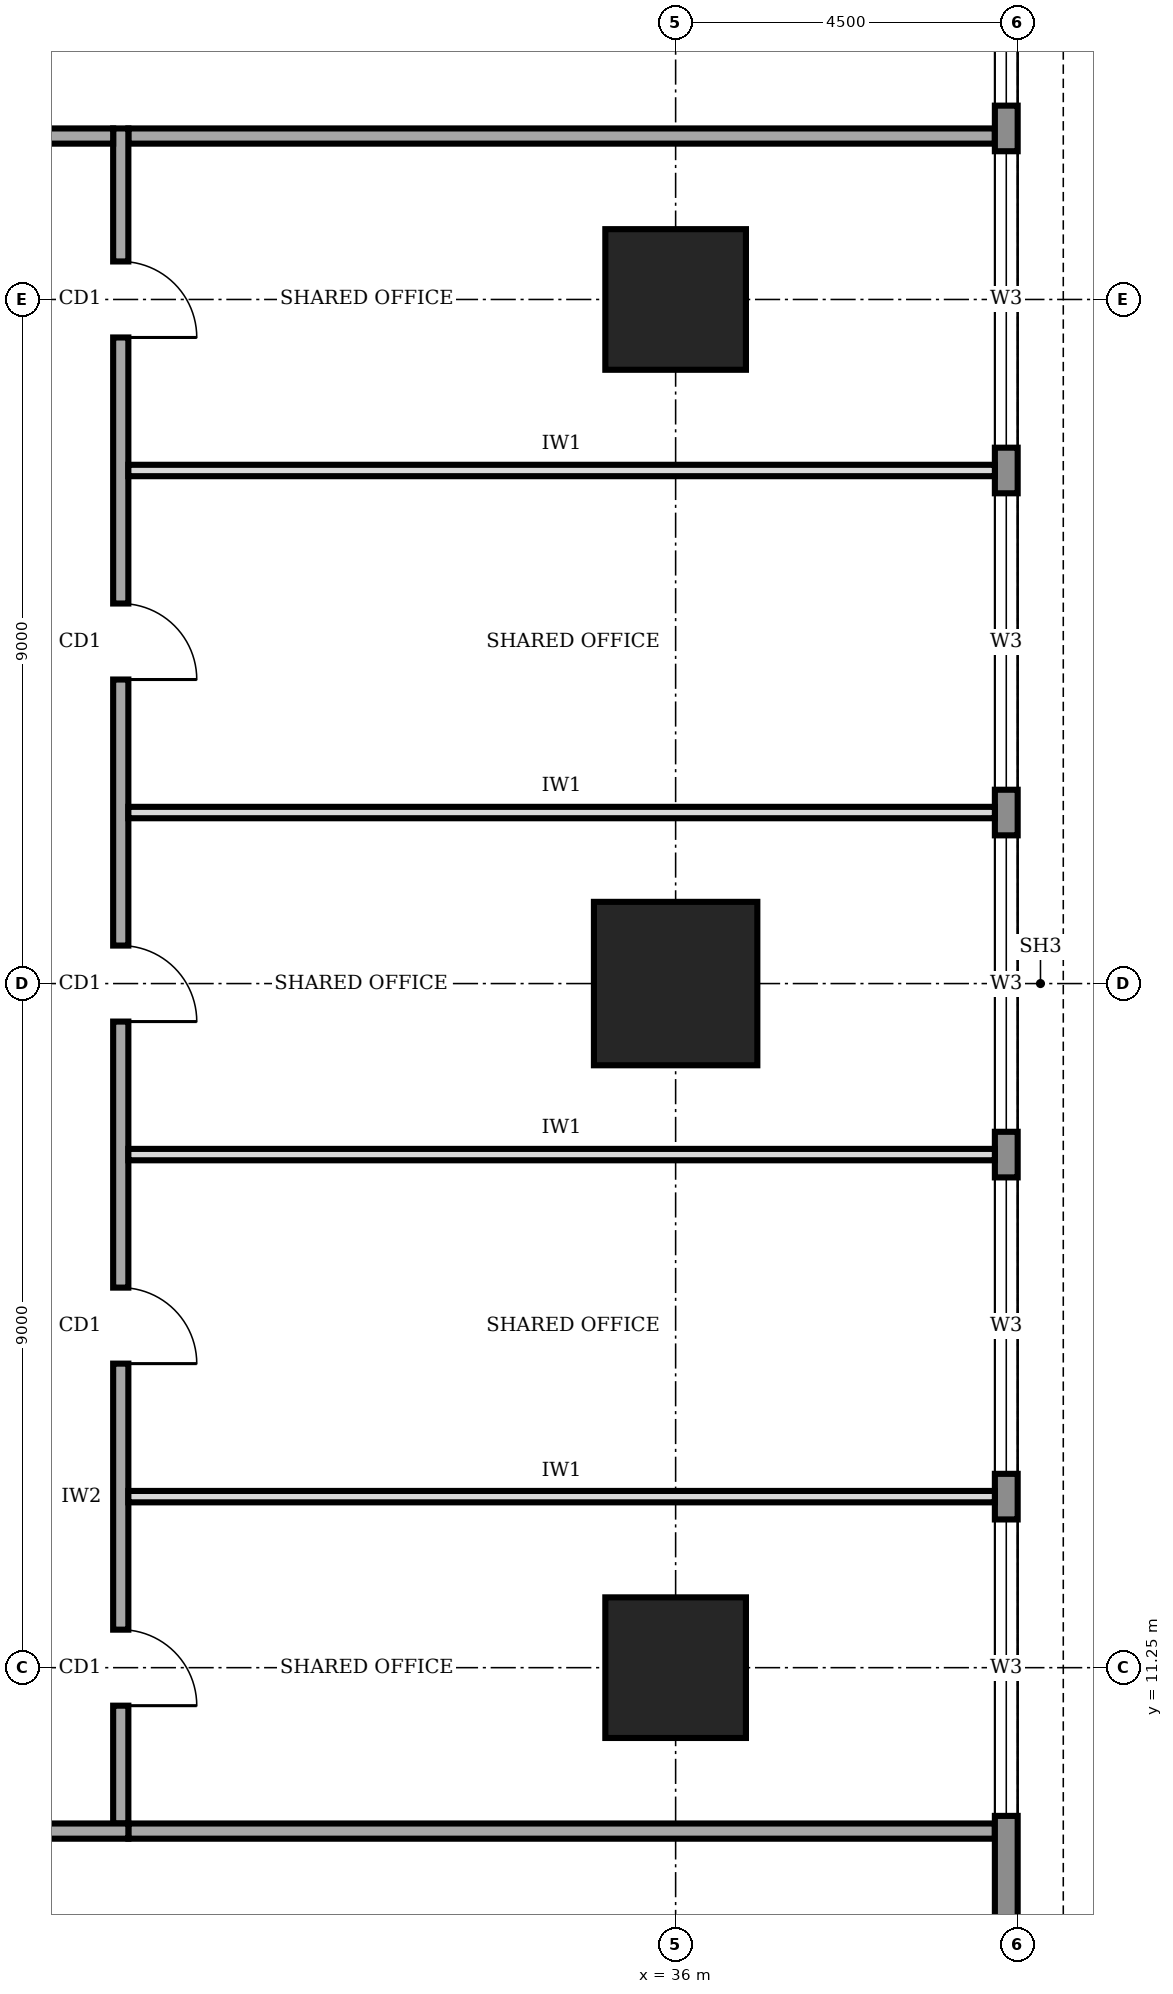
"""IFC4 building model, lengths in metres.
Left out: names, types, materials, properties, quantities, classifications, styles, units other than length and angle.
Written with IfcOpenShell. Run it as: python <this file> out.ifc"""

import sys

from ifc_helpers import new_model, si_unit, direction, frame, frame_2d, origin, origin_2d, place, context, subcontext, project, spatial, rectangle, extrude, element, fill, save


model = new_model("IFC4")
c1 = context("Model", 3, precision=1e-05, world=origin(), true_north=direction((0.0, 1.0)))
c2 = subcontext(c1, "Body", "Model", "MODEL_VIEW")
j1 = project(units=[si_unit("LENGTHUNIT", "METRE"), si_unit("PLANEANGLEUNIT", "RADIAN")], contexts=[c1])
p1 = place(None, origin())
s1 = spatial("IfcSite", under=j1, at=p1, CompositionType="ELEMENT")
p2 = place(p1, origin())
s2 = spatial("IfcBuilding", under=s1, at=p2, CompositionType="ELEMENT")
p3 = place(p2, frame((0.0, 0.0, 257.0)))
s3 = spatial("IfcBuildingStorey", under=s2, at=p3, CompositionType="ELEMENT", Elevation=257.0)
p4 = place(p3, frame((36.0, 11.25, 0.0), z_axis=(0.0, 0.0, 1.0), x_axis=(1.0, 0.0, 0.0)))
e1 = element("IfcColumn", 1, at=p4, inside=s3, PredefinedType="COLUMN", context=c2, shape_type="SweptSolid", body=[
    extrude(rectangle(XDim=1.85, YDim=1.85, at=origin_2d()), origin(), (0.0, 0.0, 1.0), 4.0),
])
p5 = place(p3, frame((36.0, 20.25, 0.0), z_axis=(0.0, 0.0, 1.0), x_axis=(1.0, 0.0, 0.0)))
e2 = element("IfcColumn", 2, at=p5, inside=s3, PredefinedType="COLUMN", context=c2, shape_type="SweptSolid", body=[
    extrude(rectangle(XDim=2.15, YDim=2.15, at=origin_2d()), origin(), (0.0, 0.0, 1.0), 4.0),
])
p6 = place(p3, frame((36.0, 29.25, 0.0), z_axis=(0.0, 0.0, 1.0), x_axis=(1.0, 0.0, 0.0)))
e3 = element("IfcColumn", 3, at=p6, inside=s3, PredefinedType="COLUMN", context=c2, shape_type="SweptSolid", body=[
    extrude(rectangle(XDim=1.85, YDim=1.85, at=origin_2d()), origin(), (0.0, 0.0, 1.0), 4.0),
])
p7 = place(p3, frame((40.35, 4.52, 0.0), z_axis=(0.0, 0.0, 1.0), x_axis=(0.0, 1.0, 0.0)))
e4 = element("IfcWall", 4, at=p7, inside=s3, PredefinedType="STANDARD", context=c2, shape_type="SweptSolid", body=[
    extrude(rectangle(XDim=31.46, YDim=0.3, at=frame_2d((15.73, 0.0))), origin(), (0.0, 0.0, 1.0), 3.75),
])
p8 = place(p7, frame((4.78, 0.0, 0.95)))
e5 = element("IfcOpeningElement", 5, at=p8, cuts=e4, PredefinedType="OPENING", context=c2, shape_type="SweptSolid", body=[
    extrude(rectangle(XDim=3.9, YDim=1.8, at=frame_2d((1.95, 0.9))), frame((0.0, 0.16, 0.0), z_axis=(0.0, -1.0, 0.0), x_axis=(1.0, 0.0, 0.0)), (0.0, 0.0, 1.0), 0.32),
])
p9 = place(p7, frame((9.28, 0.0, 0.95)))
e6 = element("IfcOpeningElement", 6, at=p9, cuts=e4, PredefinedType="OPENING", context=c2, shape_type="SweptSolid", body=[
    extrude(rectangle(XDim=3.9, YDim=1.8, at=frame_2d((1.95, 0.9))), frame((0.0, 0.16, 0.0), z_axis=(0.0, -1.0, 0.0), x_axis=(1.0, 0.0, 0.0)), (0.0, 0.0, 1.0), 0.32),
])
p10 = place(p7, frame((13.78, 0.0, 0.95)))
e7 = element("IfcOpeningElement", 7, at=p10, cuts=e4, PredefinedType="OPENING", context=c2, shape_type="SweptSolid", body=[
    extrude(rectangle(XDim=3.9, YDim=1.8, at=frame_2d((1.95, 0.9))), frame((0.0, 0.16, 0.0), z_axis=(0.0, -1.0, 0.0), x_axis=(1.0, 0.0, 0.0)), (0.0, 0.0, 1.0), 0.32),
])
p11 = place(p7, frame((18.28, 0.0, 0.95)))
e8 = element("IfcOpeningElement", 8, at=p11, cuts=e4, PredefinedType="OPENING", context=c2, shape_type="SweptSolid", body=[
    extrude(rectangle(XDim=3.9, YDim=1.8, at=frame_2d((1.95, 0.9))), frame((0.0, 0.16, 0.0), z_axis=(0.0, -1.0, 0.0), x_axis=(1.0, 0.0, 0.0)), (0.0, 0.0, 1.0), 0.32),
])
p12 = place(p7, frame((22.78, 0.0, 0.95)))
e9 = element("IfcOpeningElement", 9, at=p12, cuts=e4, PredefinedType="OPENING", context=c2, shape_type="SweptSolid", body=[
    extrude(rectangle(XDim=3.9, YDim=1.8, at=frame_2d((1.95, 0.9))), frame((0.0, 0.16, 0.0), z_axis=(0.0, -1.0, 0.0), x_axis=(1.0, 0.0, 0.0)), (0.0, 0.0, 1.0), 0.32),
])
p13 = place(p7, frame((27.28, 0.0, 0.95)))
e10 = element("IfcOpeningElement", 10, at=p13, cuts=e4, PredefinedType="OPENING", context=c2, shape_type="SweptSolid", body=[
    extrude(rectangle(XDim=3.9, YDim=1.8, at=frame_2d((1.95, 0.9))), frame((0.0, 0.16, 0.0), z_axis=(0.0, -1.0, 0.0), x_axis=(1.0, 0.0, 0.0)), (0.0, 0.0, 1.0), 0.32),
])
p14 = place(p3, frame((11.9, 9.1, 0.0), z_axis=(0.0, 0.0, 1.0), x_axis=(1.0, 0.0, 0.0)))
e11 = element("IfcWall", 11, at=p14, inside=s3, PredefinedType="SOLIDWALL", context=c2, shape_type="SweptSolid", body=[
    extrude(rectangle(XDim=16.9, YDim=0.2, at=frame_2d((8.45, 0.0))), origin(), (0.0, 0.0, 1.0), 3.75),
])
p15 = place(p14, frame((2.25, 0.0, 0.0)))
e12 = element("IfcOpeningElement", 12, at=p15, cuts=e11, PredefinedType="OPENING", context=c2, shape_type="SweptSolid", body=[
    extrude(rectangle(XDim=1.4, YDim=2.1, at=frame_2d((0.7, 1.05))), frame((0.0, 0.11, 0.0), z_axis=(0.0, -1.0, 0.0), x_axis=(1.0, 0.0, 0.0)), (0.0, 0.0, 1.0), 0.22),
])
p16 = place(p14, frame((10.8, 0.0, 0.0)))
e13 = element("IfcOpeningElement", 13, at=p16, cuts=e11, PredefinedType="OPENING", context=c2, shape_type="SweptSolid", body=[
    extrude(rectangle(XDim=1.4, YDim=2.1, at=frame_2d((0.7, 1.05))), frame((0.0, 0.11, 0.0), z_axis=(0.0, -1.0, 0.0), x_axis=(1.0, 0.0, 0.0)), (0.0, 0.0, 1.0), 0.22),
])
p17 = place(p3, frame((28.7, 9.2, 0.0), z_axis=(0.0, 0.0, 1.0), x_axis=(0.0, 1.0, 0.0)))
e14 = element("IfcWall", 14, at=p17, inside=s3, PredefinedType="SOLIDWALL", context=c2, shape_type="SweptSolid", body=[
    extrude(rectangle(XDim=22.3, YDim=0.2, at=frame_2d((11.15, 0.0))), origin(), (0.0, 0.0, 1.0), 3.75),
])
p18 = place(p17, frame((1.55, 0.0, 0.0)))
e15 = element("IfcOpeningElement", 15, at=p18, cuts=e14, PredefinedType="OPENING", context=c2, shape_type="SweptSolid", body=[
    extrude(rectangle(XDim=1.0, YDim=2.1, at=frame_2d((0.5, 1.05))), frame((0.0, 0.11, 0.0), z_axis=(0.0, -1.0, 0.0), x_axis=(1.0, 0.0, 0.0)), (0.0, 0.0, 1.0), 0.22),
])
p19 = place(p17, frame((6.05, 0.0, 0.0)))
e16 = element("IfcOpeningElement", 16, at=p19, cuts=e14, PredefinedType="OPENING", context=c2, shape_type="SweptSolid", body=[
    extrude(rectangle(XDim=1.0, YDim=2.1, at=frame_2d((0.5, 1.05))), frame((0.0, 0.11, 0.0), z_axis=(0.0, -1.0, 0.0), x_axis=(1.0, 0.0, 0.0)), (0.0, 0.0, 1.0), 0.22),
])
p20 = place(p17, frame((10.55, 0.0, 0.0)))
e17 = element("IfcOpeningElement", 17, at=p20, cuts=e14, PredefinedType="OPENING", context=c2, shape_type="SweptSolid", body=[
    extrude(rectangle(XDim=1.0, YDim=2.1, at=frame_2d((0.5, 1.05))), frame((0.0, 0.11, 0.0), z_axis=(0.0, -1.0, 0.0), x_axis=(1.0, 0.0, 0.0)), (0.0, 0.0, 1.0), 0.22),
])
p21 = place(p17, frame((15.05, 0.0, 0.0)))
e18 = element("IfcOpeningElement", 18, at=p21, cuts=e14, PredefinedType="OPENING", context=c2, shape_type="SweptSolid", body=[
    extrude(rectangle(XDim=1.0, YDim=2.1, at=frame_2d((0.5, 1.05))), frame((0.0, 0.11, 0.0), z_axis=(0.0, -1.0, 0.0), x_axis=(1.0, 0.0, 0.0)), (0.0, 0.0, 1.0), 0.22),
])
p22 = place(p17, frame((19.55, 0.0, 0.0)))
e19 = element("IfcOpeningElement", 19, at=p22, cuts=e14, PredefinedType="OPENING", context=c2, shape_type="SweptSolid", body=[
    extrude(rectangle(XDim=1.0, YDim=2.1, at=frame_2d((0.5, 1.05))), frame((0.0, 0.11, 0.0), z_axis=(0.0, -1.0, 0.0), x_axis=(1.0, 0.0, 0.0)), (0.0, 0.0, 1.0), 0.22),
])
p23 = place(p3, frame((28.6, 31.4, 0.0), z_axis=(0.0, 0.0, 1.0), x_axis=(-1.0, 0.0, 0.0)))
e20 = element("IfcWall", 20, at=p23, inside=s3, PredefinedType="SOLIDWALL", context=c2, shape_type="SweptSolid", body=[
    extrude(rectangle(XDim=16.9, YDim=0.2, at=frame_2d((8.45, 0.0))), origin(), (0.0, 0.0, 1.0), 3.75),
])
p24 = place(p23, frame((15.425, 0.0, 0.0)))
e21 = element("IfcOpeningElement", 21, at=p24, cuts=e20, PredefinedType="OPENING", context=c2, shape_type="SweptSolid", body=[
    extrude(rectangle(XDim=1.0, YDim=2.1, at=frame_2d((0.5, 1.05))), frame((0.0, 0.11, 0.0), z_axis=(0.0, -1.0, 0.0), x_axis=(1.0, 0.0, 0.0)), (0.0, 0.0, 1.0), 0.22),
])
p25 = place(p23, frame((10.1, 0.0, 0.0)))
e22 = element("IfcOpeningElement", 22, at=p25, cuts=e20, PredefinedType="OPENING", context=c2, shape_type="SweptSolid", body=[
    extrude(rectangle(XDim=1.0, YDim=2.1, at=frame_2d((0.5, 1.05))), frame((0.0, 0.11, 0.0), z_axis=(0.0, -1.0, 0.0), x_axis=(1.0, 0.0, 0.0)), (0.0, 0.0, 1.0), 0.22),
])
p26 = place(p23, frame((2.25, 0.0, 0.0)))
e23 = element("IfcOpeningElement", 23, at=p26, cuts=e20, PredefinedType="OPENING", context=c2, shape_type="SweptSolid", body=[
    extrude(rectangle(XDim=1.4, YDim=2.1, at=frame_2d((0.7, 1.05))), frame((0.0, 0.11, 0.0), z_axis=(0.0, -1.0, 0.0), x_axis=(1.0, 0.0, 0.0)), (0.0, 0.0, 1.0), 0.22),
])
for number, where, z_axis, x_axis in (
    (24, (28.8, 9.1, 0.0), (0.0, 0.0, 1.0), (1.0, 0.0, 0.0)),
    (25, (28.8, 31.4, 0.0), (0.0, 0.0, 1.0), (1.0, 0.0, 0.0)),
):
    element("IfcWall", number, at=place(p3, frame(where, z_axis=z_axis, x_axis=x_axis)), inside=s3, PredefinedType="SOLIDWALL", context=c2, shape_type="SweptSolid", body=[
        extrude(rectangle(XDim=11.4, YDim=0.2, at=frame_2d((5.7, 0.0))), origin(), (0.0, 0.0, 1.0), 3.75),
    ])
for number, where, z_axis, x_axis in (
    (26, (28.8, 13.5, 0.0), (0.0, 0.0, 1.0), (1.0, 0.0, 0.0)),
    (27, (28.8, 18.0, 0.0), (0.0, 0.0, 1.0), (1.0, 0.0, 0.0)),
    (28, (28.8, 22.5, 0.0), (0.0, 0.0, 1.0), (1.0, 0.0, 0.0)),
    (29, (28.8, 27.0, 0.0), (0.0, 0.0, 1.0), (1.0, 0.0, 0.0)),
):
    element("IfcWall", number, at=place(p3, frame(where, z_axis=z_axis, x_axis=x_axis)), inside=s3, PredefinedType="PARTITIONING", context=c2, shape_type="SweptSolid", body=[
        extrude(rectangle(XDim=11.4, YDim=0.15, at=frame_2d((5.7, 0.0))), origin(), (0.0, 0.0, 1.0), 3.75),
    ])
p27 = place(p8, origin())
e30 = element("IfcWindow", 30, at=p27, inside=s3, PartitioningType="SINGLE_PANEL", PredefinedType="WINDOW", context=c2, shape_type="SweptSolid", body=[
    extrude(rectangle(XDim=3.9, YDim=1.8, at=frame_2d((1.95, 0.9))), frame((0.0, 0.03, 0.0), z_axis=(0.0, -1.0, 0.0), x_axis=(1.0, 0.0, 0.0)), (0.0, 0.0, 1.0), 0.06),
])
fill(e5, e30)
p28 = place(p9, origin())
e31 = element("IfcWindow", 31, at=p28, inside=s3, PartitioningType="SINGLE_PANEL", PredefinedType="WINDOW", context=c2, shape_type="SweptSolid", body=[
    extrude(rectangle(XDim=3.9, YDim=1.8, at=frame_2d((1.95, 0.9))), frame((0.0, 0.03, 0.0), z_axis=(0.0, -1.0, 0.0), x_axis=(1.0, 0.0, 0.0)), (0.0, 0.0, 1.0), 0.06),
])
fill(e6, e31)
p29 = place(p10, origin())
e32 = element("IfcWindow", 32, at=p29, inside=s3, PartitioningType="SINGLE_PANEL", PredefinedType="WINDOW", context=c2, shape_type="SweptSolid", body=[
    extrude(rectangle(XDim=3.9, YDim=1.8, at=frame_2d((1.95, 0.9))), frame((0.0, 0.03, 0.0), z_axis=(0.0, -1.0, 0.0), x_axis=(1.0, 0.0, 0.0)), (0.0, 0.0, 1.0), 0.06),
])
fill(e7, e32)
p30 = place(p11, origin())
e33 = element("IfcWindow", 33, at=p30, inside=s3, PartitioningType="SINGLE_PANEL", PredefinedType="WINDOW", context=c2, shape_type="SweptSolid", body=[
    extrude(rectangle(XDim=3.9, YDim=1.8, at=frame_2d((1.95, 0.9))), frame((0.0, 0.03, 0.0), z_axis=(0.0, -1.0, 0.0), x_axis=(1.0, 0.0, 0.0)), (0.0, 0.0, 1.0), 0.06),
])
fill(e8, e33)
p31 = place(p12, origin())
e34 = element("IfcWindow", 34, at=p31, inside=s3, PartitioningType="SINGLE_PANEL", PredefinedType="WINDOW", context=c2, shape_type="SweptSolid", body=[
    extrude(rectangle(XDim=3.9, YDim=1.8, at=frame_2d((1.95, 0.9))), frame((0.0, 0.03, 0.0), z_axis=(0.0, -1.0, 0.0), x_axis=(1.0, 0.0, 0.0)), (0.0, 0.0, 1.0), 0.06),
])
fill(e9, e34)
p32 = place(p13, origin())
e35 = element("IfcWindow", 35, at=p32, inside=s3, PartitioningType="SINGLE_PANEL", PredefinedType="WINDOW", context=c2, shape_type="SweptSolid", body=[
    extrude(rectangle(XDim=3.9, YDim=1.8, at=frame_2d((1.95, 0.9))), frame((0.0, 0.03, 0.0), z_axis=(0.0, -1.0, 0.0), x_axis=(1.0, 0.0, 0.0)), (0.0, 0.0, 1.0), 0.06),
])
fill(e10, e35)
p33 = place(p18, frame((1.0, 0.0, 0.0), z_axis=(0.0, 0.0, 1.0), x_axis=(-1.0, 0.0, 0.0)))
e36 = element("IfcDoor", 36, at=p33, inside=s3, OperationType="SINGLE_SWING_RIGHT", PredefinedType="DOOR", context=c2, shape_type="SweptSolid", body=[
    extrude(rectangle(XDim=1.0, YDim=2.1, at=frame_2d((0.5, 1.05))), frame((0.0, 0.025, 0.0), z_axis=(0.0, -1.0, 0.0), x_axis=(1.0, 0.0, 0.0)), (0.0, 0.0, 1.0), 0.05),
])
fill(e15, e36)
p34 = place(p19, frame((1.0, 0.0, 0.0), z_axis=(0.0, 0.0, 1.0), x_axis=(-1.0, 0.0, 0.0)))
e37 = element("IfcDoor", 37, at=p34, inside=s3, OperationType="SINGLE_SWING_RIGHT", PredefinedType="DOOR", context=c2, shape_type="SweptSolid", body=[
    extrude(rectangle(XDim=1.0, YDim=2.1, at=frame_2d((0.5, 1.05))), frame((0.0, 0.025, 0.0), z_axis=(0.0, -1.0, 0.0), x_axis=(1.0, 0.0, 0.0)), (0.0, 0.0, 1.0), 0.05),
])
fill(e16, e37)
p35 = place(p20, frame((1.0, 0.0, 0.0), z_axis=(0.0, 0.0, 1.0), x_axis=(-1.0, 0.0, 0.0)))
e38 = element("IfcDoor", 38, at=p35, inside=s3, OperationType="SINGLE_SWING_RIGHT", PredefinedType="DOOR", context=c2, shape_type="SweptSolid", body=[
    extrude(rectangle(XDim=1.0, YDim=2.1, at=frame_2d((0.5, 1.05))), frame((0.0, 0.025, 0.0), z_axis=(0.0, -1.0, 0.0), x_axis=(1.0, 0.0, 0.0)), (0.0, 0.0, 1.0), 0.05),
])
fill(e17, e38)
p36 = place(p21, frame((1.0, 0.0, 0.0), z_axis=(0.0, 0.0, 1.0), x_axis=(-1.0, 0.0, 0.0)))
e39 = element("IfcDoor", 39, at=p36, inside=s3, OperationType="SINGLE_SWING_RIGHT", PredefinedType="DOOR", context=c2, shape_type="SweptSolid", body=[
    extrude(rectangle(XDim=1.0, YDim=2.1, at=frame_2d((0.5, 1.05))), frame((0.0, 0.025, 0.0), z_axis=(0.0, -1.0, 0.0), x_axis=(1.0, 0.0, 0.0)), (0.0, 0.0, 1.0), 0.05),
])
fill(e18, e39)
p37 = place(p22, frame((1.0, 0.0, 0.0), z_axis=(0.0, 0.0, 1.0), x_axis=(-1.0, 0.0, 0.0)))
e40 = element("IfcDoor", 40, at=p37, inside=s3, OperationType="SINGLE_SWING_RIGHT", PredefinedType="DOOR", context=c2, shape_type="SweptSolid", body=[
    extrude(rectangle(XDim=1.0, YDim=2.1, at=frame_2d((0.5, 1.05))), frame((0.0, 0.025, 0.0), z_axis=(0.0, -1.0, 0.0), x_axis=(1.0, 0.0, 0.0)), (0.0, 0.0, 1.0), 0.05),
])
fill(e19, e40)
save(model, sys.argv[1])
